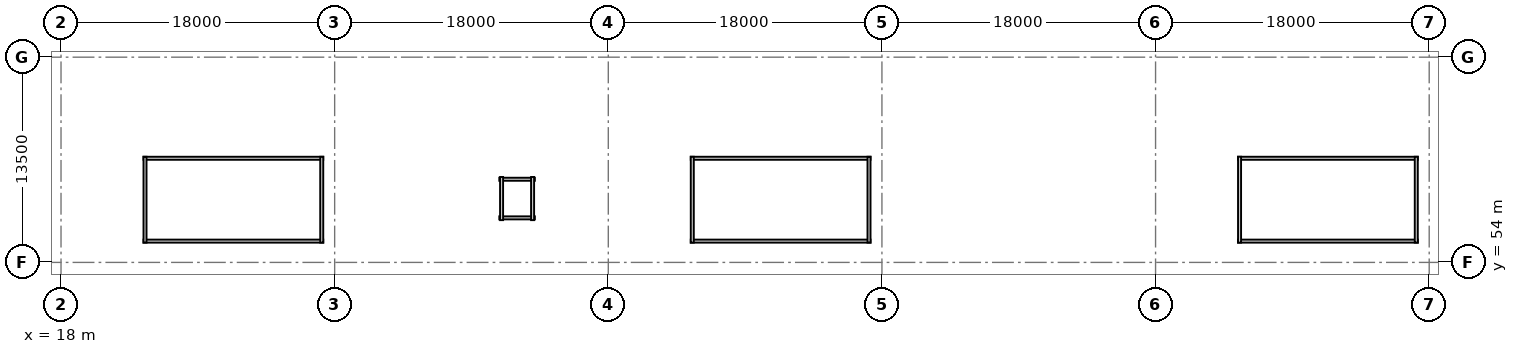
"""IFC4 building model, lengths in metres.
Left out: names, types, materials, properties, quantities, classifications, styles, units other than length and angle.
Written with IfcOpenShell. Run it as: python <this file> out.ifc"""

import sys

from ifc_helpers import new_model, si_unit, direction, frame, frame_2d, origin, origin_2d, place, context, subcontext, project, spatial, rectangle, circle, extrude, element, fill, save


model = new_model("IFC4")
c1 = context("Model", 3, precision=1e-05, world=origin(), true_north=direction((0.0, 1.0)))
c2 = subcontext(c1, "Body", "Model", "MODEL_VIEW")
j1 = project(units=[si_unit("LENGTHUNIT", "METRE"), si_unit("PLANEANGLEUNIT", "RADIAN")], contexts=[c1])
p1 = place(None, origin())
s1 = spatial("IfcSite", under=j1, at=p1, CompositionType="ELEMENT")
p2 = place(p1, origin())
s2 = spatial("IfcBuilding", under=s1, at=p2, CompositionType="ELEMENT")
p3 = place(p2, frame((0.0, 0.0, 6.6)))
s3 = spatial("IfcBuildingStorey", under=s2, at=p3, CompositionType="ELEMENT", Elevation=6.6)
p4 = place(p3, frame((18.0, 54.0, 0.0), z_axis=(0.0, 0.0, 1.0), x_axis=(1.0, 0.0, 0.0)))
e1 = element("IfcColumn", 1, at=p4, inside=s3, PredefinedType="COLUMN", context=c2, shape_type="SweptSolid", body=[
    extrude(circle(Radius=0.4, at=origin_2d()), origin(), (0.0, 0.0, 1.0), 4.2),
])
p5 = place(p3, frame((18.0, 67.5, 0.0), z_axis=(0.0, 0.0, 1.0), x_axis=(1.0, 0.0, 0.0)))
e2 = element("IfcColumn", 2, at=p5, inside=s3, PredefinedType="COLUMN", context=c2, shape_type="SweptSolid", body=[
    extrude(rectangle(XDim=1.4, YDim=1.1, at=origin_2d()), origin(), (0.0, 0.0, 1.0), 4.2),
])
p6 = place(p3, frame((36.0, 54.0, 0.0), z_axis=(0.0, 0.0, 1.0), x_axis=(1.0, 0.0, 0.0)))
e3 = element("IfcColumn", 3, at=p6, inside=s3, PredefinedType="COLUMN", context=c2, shape_type="SweptSolid", body=[
    extrude(circle(Radius=0.4, at=origin_2d()), origin(), (0.0, 0.0, 1.0), 4.2),
])
p7 = place(p3, frame((36.0, 67.5, 0.0), z_axis=(0.0, 0.0, 1.0), x_axis=(1.0, 0.0, 0.0)))
e4 = element("IfcColumn", 4, at=p7, inside=s3, PredefinedType="COLUMN", context=c2, shape_type="SweptSolid", body=[
    extrude(rectangle(XDim=1.4, YDim=1.1, at=origin_2d()), origin(), (0.0, 0.0, 1.0), 4.2),
])
p8 = place(p3, frame((54.0, 54.0, 0.0), z_axis=(0.0, 0.0, 1.0), x_axis=(1.0, 0.0, 0.0)))
e5 = element("IfcColumn", 5, at=p8, inside=s3, PredefinedType="COLUMN", context=c2, shape_type="SweptSolid", body=[
    extrude(circle(Radius=0.4, at=origin_2d()), origin(), (0.0, 0.0, 1.0), 4.2),
])
p9 = place(p3, frame((54.0, 67.5, 0.0), z_axis=(0.0, 0.0, 1.0), x_axis=(1.0, 0.0, 0.0)))
e6 = element("IfcColumn", 6, at=p9, inside=s3, PredefinedType="COLUMN", context=c2, shape_type="SweptSolid", body=[
    extrude(rectangle(XDim=1.4, YDim=1.1, at=origin_2d()), origin(), (0.0, 0.0, 1.0), 4.2),
])
p10 = place(p3, frame((72.0, 54.0, 0.0), z_axis=(0.0, 0.0, 1.0), x_axis=(1.0, 0.0, 0.0)))
e7 = element("IfcColumn", 7, at=p10, inside=s3, PredefinedType="COLUMN", context=c2, shape_type="SweptSolid", body=[
    extrude(circle(Radius=0.4, at=origin_2d()), origin(), (0.0, 0.0, 1.0), 4.2),
])
p11 = place(p3, frame((72.0, 67.5, 0.0), z_axis=(0.0, 0.0, 1.0), x_axis=(1.0, 0.0, 0.0)))
e8 = element("IfcColumn", 8, at=p11, inside=s3, PredefinedType="COLUMN", context=c2, shape_type="SweptSolid", body=[
    extrude(rectangle(XDim=1.4, YDim=1.1, at=origin_2d()), origin(), (0.0, 0.0, 1.0), 4.2),
])
p12 = place(p3, frame((90.0, 54.0, 0.0), z_axis=(0.0, 0.0, 1.0), x_axis=(1.0, 0.0, 0.0)))
e9 = element("IfcColumn", 9, at=p12, inside=s3, PredefinedType="COLUMN", context=c2, shape_type="SweptSolid", body=[
    extrude(circle(Radius=0.4, at=origin_2d()), origin(), (0.0, 0.0, 1.0), 4.2),
])
p13 = place(p3, frame((90.0, 67.5, 0.0), z_axis=(0.0, 0.0, 1.0), x_axis=(1.0, 0.0, 0.0)))
e10 = element("IfcColumn", 10, at=p13, inside=s3, PredefinedType="COLUMN", context=c2, shape_type="SweptSolid", body=[
    extrude(rectangle(XDim=1.4, YDim=1.1, at=origin_2d()), origin(), (0.0, 0.0, 1.0), 4.2),
])
p14 = place(p3, frame((108.0, 54.0, 0.0), z_axis=(0.0, 0.0, 1.0), x_axis=(1.0, 0.0, 0.0)))
e11 = element("IfcColumn", 11, at=p14, inside=s3, PredefinedType="COLUMN", context=c2, shape_type="SweptSolid", body=[
    extrude(rectangle(XDim=0.8, YDim=0.8, at=origin_2d()), origin(), (0.0, 0.0, 1.0), 4.2),
])
p15 = place(p3, frame((108.0, 67.5, 0.0), z_axis=(0.0, 0.0, 1.0), x_axis=(1.0, 0.0, 0.0)))
e12 = element("IfcColumn", 12, at=p15, inside=s3, PredefinedType="COLUMN", context=c2, shape_type="SweptSolid", body=[
    extrude(rectangle(XDim=1.4, YDim=1.1, at=origin_2d()), origin(), (0.0, 0.0, 1.0), 4.2),
])
for number, where, z_axis, x_axis in (
    (13, (23.425, 55.4, 0.0), (0.0, 0.0, 1.0), (1.0, 0.0, 0.0)),
    (14, (35.25, 60.85, 0.0), (0.0, 0.0, 1.0), (-1.0, 0.0, 0.0)),
):
    element("IfcWall", number, at=place(p3, frame(where, z_axis=z_axis, x_axis=x_axis)), inside=s3, PredefinedType="SOLIDWALL", context=c2, shape_type="SweptSolid", body=[
        extrude(rectangle(XDim=11.825, YDim=0.2, at=frame_2d((5.913, 0.0))), origin(), (0.0, 0.0, 1.0), 2.45),
    ])
p16 = place(p3, frame((35.15, 55.3, 0.0), z_axis=(0.0, 0.0, 1.0), x_axis=(0.0, 1.0, 0.0)))
e15 = element("IfcWall", 15, at=p16, inside=s3, PredefinedType="SOLIDWALL", context=c2, shape_type="SweptSolid", body=[
    extrude(rectangle(XDim=5.65, YDim=0.2, at=frame_2d((2.825, 0.0))), origin(), (0.0, 0.0, 1.0), 2.45),
])
p17 = place(p3, frame((23.525, 60.95, 0.0), z_axis=(0.0, 0.0, 1.0), x_axis=(0.0, -1.0, 0.0)))
e16 = element("IfcWall", 16, at=p17, inside=s3, PredefinedType="SOLIDWALL", context=c2, shape_type="SweptSolid", body=[
    extrude(rectangle(XDim=5.65, YDim=0.2, at=frame_2d((2.825, 0.0))), origin(), (0.0, 0.0, 1.0), 2.45),
])
p18 = place(p17, frame((2.025, 0.0, 0.0)))
e17 = element("IfcOpeningElement", 17, at=p18, cuts=e16, PredefinedType="OPENING", context=c2, shape_type="SweptSolid", body=[
    extrude(rectangle(XDim=1.6, YDim=2.15, at=frame_2d((0.8, 1.075))), frame((0.0, 0.11, 0.0), z_axis=(0.0, -1.0, 0.0), x_axis=(1.0, 0.0, 0.0)), (0.0, 0.0, 1.0), 0.22),
])
for number, where, z_axis, x_axis in (
    (18, (59.425, 55.4, 0.0), (0.0, 0.0, 1.0), (1.0, 0.0, 0.0)),
    (19, (71.25, 60.85, 0.0), (0.0, 0.0, 1.0), (-1.0, 0.0, 0.0)),
):
    element("IfcWall", number, at=place(p3, frame(where, z_axis=z_axis, x_axis=x_axis)), inside=s3, PredefinedType="SOLIDWALL", context=c2, shape_type="SweptSolid", body=[
        extrude(rectangle(XDim=11.825, YDim=0.2, at=frame_2d((5.913, 0.0))), origin(), (0.0, 0.0, 1.0), 2.45),
    ])
p19 = place(p3, frame((71.15, 55.3, 0.0), z_axis=(0.0, 0.0, 1.0), x_axis=(0.0, 1.0, 0.0)))
e20 = element("IfcWall", 20, at=p19, inside=s3, PredefinedType="SOLIDWALL", context=c2, shape_type="SweptSolid", body=[
    extrude(rectangle(XDim=5.65, YDim=0.2, at=frame_2d((2.825, 0.0))), origin(), (0.0, 0.0, 1.0), 2.45),
])
p20 = place(p3, frame((59.525, 60.95, 0.0), z_axis=(0.0, 0.0, 1.0), x_axis=(0.0, -1.0, 0.0)))
e21 = element("IfcWall", 21, at=p20, inside=s3, PredefinedType="SOLIDWALL", context=c2, shape_type="SweptSolid", body=[
    extrude(rectangle(XDim=5.65, YDim=0.2, at=frame_2d((2.825, 0.0))), origin(), (0.0, 0.0, 1.0), 2.45),
])
p21 = place(p20, frame((2.025, 0.0, 0.0)))
e22 = element("IfcOpeningElement", 22, at=p21, cuts=e21, PredefinedType="OPENING", context=c2, shape_type="SweptSolid", body=[
    extrude(rectangle(XDim=1.6, YDim=2.15, at=frame_2d((0.8, 1.075))), frame((0.0, 0.11, 0.0), z_axis=(0.0, -1.0, 0.0), x_axis=(1.0, 0.0, 0.0)), (0.0, 0.0, 1.0), 0.22),
])
for number, where, z_axis, x_axis in (
    (23, (95.425, 55.4, 0.0), (0.0, 0.0, 1.0), (1.0, 0.0, 0.0)),
    (24, (107.25, 60.85, 0.0), (0.0, 0.0, 1.0), (-1.0, 0.0, 0.0)),
):
    element("IfcWall", number, at=place(p3, frame(where, z_axis=z_axis, x_axis=x_axis)), inside=s3, PredefinedType="SOLIDWALL", context=c2, shape_type="SweptSolid", body=[
        extrude(rectangle(XDim=11.825, YDim=0.2, at=frame_2d((5.913, 0.0))), origin(), (0.0, 0.0, 1.0), 2.45),
    ])
p22 = place(p3, frame((107.15, 55.3, 0.0), z_axis=(0.0, 0.0, 1.0), x_axis=(0.0, 1.0, 0.0)))
e25 = element("IfcWall", 25, at=p22, inside=s3, PredefinedType="SOLIDWALL", context=c2, shape_type="SweptSolid", body=[
    extrude(rectangle(XDim=5.65, YDim=0.2, at=frame_2d((2.825, 0.0))), origin(), (0.0, 0.0, 1.0), 2.45),
])
p23 = place(p3, frame((95.525, 60.95, 0.0), z_axis=(0.0, 0.0, 1.0), x_axis=(0.0, -1.0, 0.0)))
e26 = element("IfcWall", 26, at=p23, inside=s3, PredefinedType="SOLIDWALL", context=c2, shape_type="SweptSolid", body=[
    extrude(rectangle(XDim=5.65, YDim=0.2, at=frame_2d((2.825, 0.0))), origin(), (0.0, 0.0, 1.0), 2.45),
])
p24 = place(p23, frame((2.025, 0.0, 0.0)))
e27 = element("IfcOpeningElement", 27, at=p24, cuts=e26, PredefinedType="OPENING", context=c2, shape_type="SweptSolid", body=[
    extrude(rectangle(XDim=1.6, YDim=2.15, at=frame_2d((0.8, 1.075))), frame((0.0, 0.11, 0.0), z_axis=(0.0, -1.0, 0.0), x_axis=(1.0, 0.0, 0.0)), (0.0, 0.0, 1.0), 0.22),
])
p25 = place(p3, frame((46.83, 56.93, 0.0), z_axis=(0.0, 0.0, 1.0), x_axis=(1.0, 0.0, 0.0)))
e28 = element("IfcWall", 28, at=p25, inside=s3, PredefinedType="SOLIDWALL", context=c2, shape_type="SweptSolid", body=[
    extrude(rectangle(XDim=2.34, YDim=0.2, at=frame_2d((1.17, 0.0))), origin(), (0.0, 0.0, 1.0), 3.875),
])
p26 = place(p3, frame((49.17, 59.47, 0.0), z_axis=(0.0, 0.0, 1.0), x_axis=(-1.0, 0.0, 0.0)))
e29 = element("IfcWall", 29, at=p26, inside=s3, PredefinedType="SOLIDWALL", context=c2, shape_type="SweptSolid", body=[
    extrude(rectangle(XDim=2.34, YDim=0.2, at=frame_2d((1.17, 0.0))), origin(), (0.0, 0.0, 1.0), 3.875),
])
p27 = place(p26, frame((0.62, 0.0, 0.0)))
e30 = element("IfcOpeningElement", 30, at=p27, cuts=e29, PredefinedType="OPENING", context=c2, shape_type="SweptSolid", body=[
    extrude(rectangle(XDim=1.1, YDim=2.15, at=frame_2d((0.55, 1.075))), frame((0.0, 0.11, 0.0), z_axis=(0.0, -1.0, 0.0), x_axis=(1.0, 0.0, 0.0)), (0.0, 0.0, 1.0), 0.22),
])
for number, where, z_axis, x_axis in (
    (31, (46.98, 59.62, 0.0), (0.0, 0.0, 1.0), (0.0, -1.0, 0.0)),
    (32, (49.02, 56.78, 0.0), (0.0, 0.0, 1.0), (0.0, 1.0, 0.0)),
):
    element("IfcWall", number, at=place(p3, frame(where, z_axis=z_axis, x_axis=x_axis)), inside=s3, PredefinedType="SOLIDWALL", context=c2, shape_type="SweptSolid", body=[
        extrude(rectangle(XDim=2.84, YDim=0.2, at=frame_2d((1.42, 0.0))), origin(), (0.0, 0.0, 1.0), 3.875),
    ])
p28 = place(p18, origin())
e33 = element("IfcDoor", 33, at=p28, inside=s3, OperationType="SINGLE_SWING_LEFT", PredefinedType="DOOR", context=c2, shape_type="SweptSolid", body=[
    extrude(rectangle(XDim=1.6, YDim=2.15, at=frame_2d((0.8, 1.075))), frame((0.0, 0.025, 0.0), z_axis=(0.0, -1.0, 0.0), x_axis=(1.0, 0.0, 0.0)), (0.0, 0.0, 1.0), 0.05),
])
fill(e17, e33)
p29 = place(p21, origin())
e34 = element("IfcDoor", 34, at=p29, inside=s3, OperationType="SINGLE_SWING_LEFT", PredefinedType="DOOR", context=c2, shape_type="SweptSolid", body=[
    extrude(rectangle(XDim=1.6, YDim=2.15, at=frame_2d((0.8, 1.075))), frame((0.0, 0.025, 0.0), z_axis=(0.0, -1.0, 0.0), x_axis=(1.0, 0.0, 0.0)), (0.0, 0.0, 1.0), 0.05),
])
fill(e22, e34)
p30 = place(p24, origin())
e35 = element("IfcDoor", 35, at=p30, inside=s3, OperationType="SINGLE_SWING_LEFT", PredefinedType="DOOR", context=c2, shape_type="SweptSolid", body=[
    extrude(rectangle(XDim=1.6, YDim=2.15, at=frame_2d((0.8, 1.075))), frame((0.0, 0.025, 0.0), z_axis=(0.0, -1.0, 0.0), x_axis=(1.0, 0.0, 0.0)), (0.0, 0.0, 1.0), 0.05),
])
fill(e27, e35)
p31 = place(p27, origin())
e36 = element("IfcDoor", 36, at=p31, inside=s3, OperationType="SLIDING_TO_LEFT", PredefinedType="DOOR", context=c2, shape_type="SweptSolid", body=[
    extrude(rectangle(XDim=1.1, YDim=2.15, at=frame_2d((0.55, 1.075))), frame((0.0, 0.025, 0.0), z_axis=(0.0, -1.0, 0.0), x_axis=(1.0, 0.0, 0.0)), (0.0, 0.0, 1.0), 0.05),
])
fill(e30, e36)
save(model, sys.argv[1])
